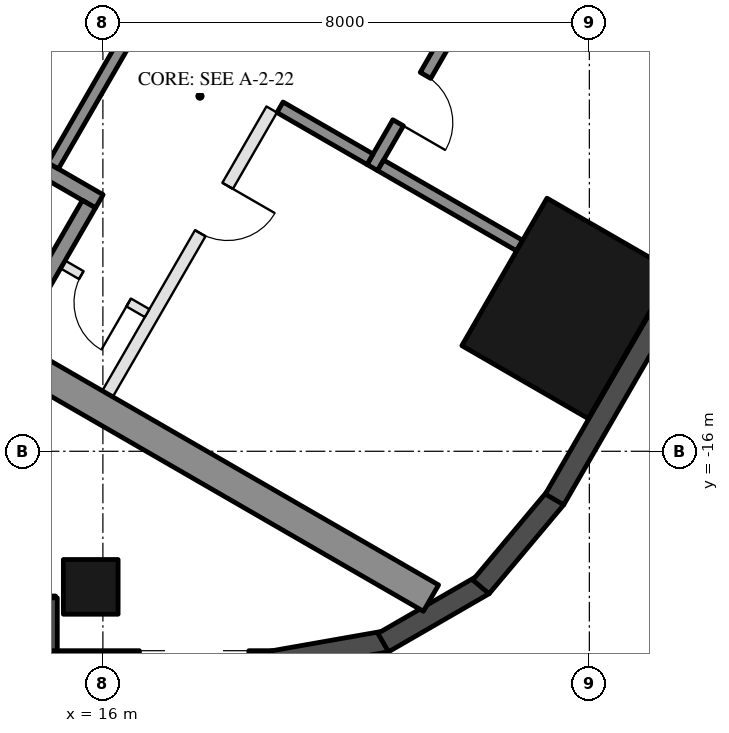
"""IFC4 building model, lengths in metres.
Left out: names, types, materials, properties, quantities, classifications, styles, units other than length and angle.
Written with IfcOpenShell. Run it as: python <this file> out.ifc"""

import sys

from ifc_helpers import new_model, si_unit, direction, frame, frame_2d, origin, origin_2d, place, context, subcontext, project, spatial, rectangle, hollow_rectangle, extrude, element, fill, save


model = new_model("IFC4")
c1 = context("Model", 3, precision=1e-05, world=origin(), true_north=direction((0.0, 1.0)))
c2 = subcontext(c1, "Body", "Model", "MODEL_VIEW")
j1 = project(units=[si_unit("LENGTHUNIT", "METRE"), si_unit("PLANEANGLEUNIT", "RADIAN")], contexts=[c1])
p1 = place(None, origin())
s1 = spatial("IfcSite", under=j1, at=p1, CompositionType="ELEMENT")
p2 = place(p1, origin())
s2 = spatial("IfcBuilding", under=s1, at=p2, CompositionType="ELEMENT")
p3 = place(p2, frame((0.0, 0.0, 102.0)))
s3 = spatial("IfcBuildingStorey", under=s2, at=p3, CompositionType="ELEMENT", Elevation=102.0)
p4 = place(p3, frame((15.8, -18.23, 0.0), z_axis=(0.0, 0.0, 1.0), x_axis=(-1.0, 0.0, 0.0)))
e1 = element("IfcColumn", 1, at=p4, inside=s3, PredefinedType="COLUMN", context=c2, shape_type="SweptSolid", body=[
    extrude(hollow_rectangle(XDim=0.9, YDim=0.9, WallThickness=0.04, at=origin_2d()), origin(), (0.0, 0.0, 1.0), 3.7),
])
p5 = place(p3, frame((23.643, -13.65, 0.0), z_axis=(0.0, 0.0, 1.0), x_axis=(0.5, 0.866025403784, 0.0)))
e2 = element("IfcColumn", 2, at=p5, inside=s3, PredefinedType="COLUMN", context=c2, shape_type="SweptSolid", body=[
    extrude(hollow_rectangle(XDim=2.8, YDim=2.4, WallThickness=0.07, at=origin_2d()), origin(), (0.0, 0.0, 1.0), 3.7),
])
p6 = place(p3, frame((8.48, -18.555, 0.0), z_axis=(0.0, 0.0, 1.0), x_axis=(1.0, 0.0, 0.0)))
e3 = element("IfcWall", 3, at=p6, inside=s3, PredefinedType="SOLIDWALL", context=c2, shape_type="SweptSolid", body=[
    extrude(rectangle(XDim=6.74, YDim=0.35, at=frame_2d((3.37, 0.0))), origin(), (0.0, 0.0, 1.0), 3.55),
])
p7 = place(p6, frame((0.32, 0.0, 0.3)))
e4 = element("IfcOpeningElement", 4, at=p7, cuts=e3, PredefinedType="OPENING", context=c2, shape_type="SweptSolid", body=[
    extrude(rectangle(XDim=2.6, YDim=2.65, at=frame_2d((1.3, 1.325))), frame((0.0, 0.185, 0.0), z_axis=(0.0, -1.0, 0.0), x_axis=(1.0, 0.0, 0.0)), (0.0, 0.0, 1.0), 0.37),
])
p8 = place(p6, frame((3.22, 0.0, 0.3)))
e5 = element("IfcOpeningElement", 5, at=p8, cuts=e3, PredefinedType="OPENING", context=c2, shape_type="SweptSolid", body=[
    extrude(rectangle(XDim=2.6, YDim=2.65, at=frame_2d((1.3, 1.325))), frame((0.0, 0.185, 0.0), z_axis=(0.0, -1.0, 0.0), x_axis=(1.0, 0.0, 0.0)), (0.0, 0.0, 1.0), 0.37),
])
p9 = place(p3, frame((15.075, -18.41, 0.0), z_axis=(0.0, 0.0, 1.0), x_axis=(0.0, -1.0, 0.0)))
e6 = element("IfcWall", 6, at=p9, inside=s3, PredefinedType="SOLIDWALL", context=c2, shape_type="SweptSolid", body=[
    extrude(rectangle(XDim=1.22, YDim=0.35, at=frame_2d((0.61, 0.0))), origin(), (0.0, 0.0, 1.0), 3.55),
])
p10 = place(p3, frame((14.9, -19.455, 0.0), z_axis=(0.0, 0.0, 1.0), x_axis=(1.0, 0.0, 0.0)))
e7 = element("IfcWall", 7, at=p10, inside=s3, PredefinedType="SOLIDWALL", context=c2, shape_type="SweptSolid", body=[
    extrude(rectangle(XDim=3.916, YDim=0.35, at=frame_2d((1.958, 0.0))), origin(), (0.0, 0.0, 1.0), 3.55),
])
p11 = place(p10, frame((1.7, 0.0, 0.3)))
e8 = element("IfcOpeningElement", 8, at=p11, cuts=e7, PredefinedType="OPENING", context=c2, shape_type="SweptSolid", body=[
    extrude(rectangle(XDim=1.8, YDim=2.65, at=frame_2d((0.9, 1.325))), frame((0.0, 0.185, 0.0), z_axis=(0.0, -1.0, 0.0), x_axis=(1.0, 0.0, 0.0)), (0.0, 0.0, 1.0), 0.37),
])
p12 = place(p3, frame((18.785, -19.458, 0.0), z_axis=(0.0, 0.0, 1.0), x_axis=(0.984798995425, 0.173697837091, 0.0)))
e9 = element("IfcWall", 9, at=p12, inside=s3, PredefinedType="SOLIDWALL", context=c2, shape_type="SweptSolid", body=[
    extrude(rectangle(XDim=1.91, YDim=0.35, at=frame_2d((0.955, 0.0))), origin(), (0.0, 0.0, 1.0), 3.55),
])
for number, where, z_axis, x_axis in (
    (10, (20.61, -19.147, 0.0), (0.0, 0.0, 1.0), (0.866, 0.5, 0.0)),
    (11, (22.217, -18.231, 0.0), (0.0, 0.0, 1.0), (0.643, 0.766, 0.0)),
):
    element("IfcWall", number, at=place(p3, frame(where, z_axis=z_axis, x_axis=x_axis)), inside=s3, PredefinedType="SOLIDWALL", context=c2, shape_type="SweptSolid", body=[
        extrude(rectangle(XDim=1.91, YDim=0.35, at=frame_2d((0.955, 0.0))), origin(), (0.0, 0.0, 1.0), 3.55),
    ])
p13 = place(p3, frame((23.427, -16.792, 0.0), z_axis=(0.0, 0.0, 1.0), x_axis=(0.500018773155, 0.866014564827, 0.0)))
e12 = element("IfcWall", 12, at=p13, inside=s3, PredefinedType="SOLIDWALL", context=c2, shape_type="SweptSolid", body=[
    extrude(rectangle(XDim=5.658, YDim=0.35, at=frame_2d((2.829, 0.0))), origin(), (0.0, 0.0, 1.0), 3.55),
])
for number, where, z_axis, x_axis in (
    (13, (8.547, -10.997, 0.0), (0.0, 0.0, 1.0), (0.866, -0.5, 0.0)),
    (14, (13.797, -1.903, 0.0), (0.0, 0.0, 1.0), (0.866, -0.5, 0.0)),
):
    element("IfcWall", number, at=place(p3, frame(where, z_axis=z_axis, x_axis=x_axis)), inside=s3, PredefinedType="SHEAR", context=c2, shape_type="SweptSolid", body=[
        extrude(rectangle(XDim=14.837, YDim=0.5, at=frame_2d((7.418, 0.0))), origin(), (0.0, 0.0, 1.0), 3.5),
    ])
p14 = place(p3, frame((10.356, -8.664, 0.0), z_axis=(0.0, 0.0, 1.0), x_axis=(0.866028629588, -0.499994412703, 0.0)))
e15 = element("IfcWall", 15, at=p14, inside=s3, PredefinedType="SHEAR", context=c2, shape_type="SweptSolid", body=[
    extrude(rectangle(XDim=6.45, YDim=0.25, at=frame_2d((3.225, 0.0))), origin(), (0.0, 0.0, 1.0), 3.5),
])
p15 = place(p14, frame((0.3, 0.0, 0.0)))
e16 = element("IfcOpeningElement", 16, at=p15, cuts=e15, PredefinedType="OPENING", context=c2, shape_type="SweptSolid", body=[
    extrude(rectangle(XDim=1.0, YDim=2.1, at=frame_2d((0.5, 1.05))), frame((0.0, 0.135, 0.0), z_axis=(0.0, -1.0, 0.0), x_axis=(1.0, 0.0, 0.0)), (0.0, 0.0, 1.0), 0.27),
])
p16 = place(p3, frame((14.496, -14.143, 0.0), z_axis=(0.0, 0.0, 1.0), x_axis=(0.500062241894, 0.865989465428, 0.0)))
e17 = element("IfcWall", 17, at=p16, inside=s3, PredefinedType="SHEAR", context=c2, shape_type="SweptSolid", body=[
    extrude(rectangle(XDim=2.55, YDim=0.25, at=frame_2d((1.275, 0.0))), origin(), (0.0, 0.0, 1.0), 3.5),
])
p17 = place(p3, frame((15.181, -11.305, 0.0), z_axis=(0.0, 0.0, 1.0), x_axis=(0.49994636267, 0.866056369097, 0.0)))
e18 = element("IfcWall", 18, at=p17, inside=s3, PredefinedType="SHEAR", context=c2, shape_type="SweptSolid", body=[
    extrude(rectangle(XDim=2.8, YDim=0.2, at=frame_2d((1.4, 0.0))), origin(), (0.0, 0.0, 1.0), 3.5),
])
p18 = place(p3, frame((20.43, -11.333, 0.0), z_axis=(0.0, 0.0, 1.0), x_axis=(0.500001309137, 0.866024647952, 0.0)))
e19 = element("IfcWall", 19, at=p18, inside=s3, PredefinedType="SHEAR", context=c2, shape_type="SweptSolid", body=[
    extrude(rectangle(XDim=2.4, YDim=0.2, at=frame_2d((1.2, 0.0))), origin(), (0.0, 0.0, 1.0), 3.5),
])
p19 = place(p18, frame((0.85, 0.0, 0.0)))
e20 = element("IfcOpeningElement", 20, at=p19, cuts=e19, PredefinedType="OPENING", context=c2, shape_type="SweptSolid", body=[
    extrude(rectangle(XDim=0.9, YDim=2.1, at=frame_2d((0.45, 1.05))), frame((0.0, 0.11, 0.0), z_axis=(0.0, -1.0, 0.0), x_axis=(1.0, 0.0, 0.0)), (0.0, 0.0, 1.0), 0.22),
])
p20 = place(p3, frame((18.913, -10.342, 0.0), z_axis=(0.0, 0.0, 1.0), x_axis=(0.866038183914, -0.499977863513, 0.0)))
e21 = element("IfcWall", 21, at=p20, inside=s3, PredefinedType="SHEAR", context=c2, shape_type="SweptSolid", body=[
    extrude(rectangle(XDim=1.71, YDim=0.2, at=frame_2d((0.855, 0.0))), origin(), (0.0, 0.0, 1.0), 3.5),
])
p21 = place(p3, frame((20.567, -11.297, 0.0), z_axis=(0.0, 0.0, 1.0), x_axis=(0.866060851709, -0.499938597367, 0.0)))
e22 = element("IfcWall", 22, at=p21, inside=s3, PredefinedType="SHEAR", context=c2, shape_type="SweptSolid", body=[
    extrude(rectangle(XDim=2.64, YDim=0.2, at=frame_2d((1.32, 0.0))), origin(), (0.0, 0.0, 1.0), 3.5),
])
p22 = place(p3, frame((16.076, -15.055, 0.0), z_axis=(0.0, 0.0, 1.0), x_axis=(0.499995103361, 0.866028230842, 0.0)))
e23 = element("IfcWall", 23, at=p22, inside=s3, PredefinedType="PARTITIONING", context=c2, shape_type="SweptSolid", body=[
    extrude(rectangle(XDim=5.4, YDim=0.2, at=frame_2d((2.7, 0.0))), origin(), (0.0, 0.0, 1.0), 3.5),
])
p23 = place(p22, frame((3.05, 0.0, 0.0)))
e24 = element("IfcOpeningElement", 24, at=p23, cuts=e23, PredefinedType="OPENING", context=c2, shape_type="SweptSolid", body=[
    extrude(rectangle(XDim=0.9, YDim=2.1, at=frame_2d((0.45, 1.05))), frame((0.0, 0.11, 0.0), z_axis=(0.0, -1.0, 0.0), x_axis=(1.0, 0.0, 0.0)), (0.0, 0.0, 1.0), 0.22),
])
p24 = place(p3, frame((15.342, -12.928, 0.0), z_axis=(0.0, 0.0, 1.0), x_axis=(0.865989903783, -0.500061482766, 0.0)))
e25 = element("IfcWall", 25, at=p24, inside=s3, PredefinedType="PARTITIONING", context=c2, shape_type="SweptSolid", body=[
    extrude(rectangle(XDim=1.6, YDim=0.15, at=frame_2d((0.8, 0.0))), origin(), (0.0, 0.0, 1.0), 3.5),
])
p25 = place(p24, frame((0.35, 0.0, 0.0)))
e26 = element("IfcOpeningElement", 26, at=p25, cuts=e25, PredefinedType="OPENING", context=c2, shape_type="SweptSolid", body=[
    extrude(rectangle(XDim=0.9, YDim=2.1, at=frame_2d((0.45, 1.05))), frame((0.0, 0.085, 0.0), z_axis=(0.0, -1.0, 0.0), x_axis=(1.0, 0.0, 0.0)), (0.0, 0.0, 1.0), 0.17),
])
p26 = place(p25, frame((0.9, 0.0, 0.0), z_axis=(0.0, 0.0, 1.0), x_axis=(-1.0, 0.0, 0.0)))
e27 = element("IfcDoor", 27, at=p26, inside=s3, OperationType="SINGLE_SWING_LEFT", PredefinedType="DOOR", context=c2, shape_type="SweptSolid", body=[
    extrude(rectangle(XDim=0.9, YDim=2.1, at=frame_2d((0.45, 1.05))), frame((0.0, 0.025, 0.0), z_axis=(0.0, -1.0, 0.0), x_axis=(1.0, 0.0, 0.0)), (0.0, 0.0, 1.0), 0.05),
])
fill(e26, e27)
p27 = place(p19, frame((0.9, 0.0, 0.0), z_axis=(0.0, 0.0, 1.0), x_axis=(-1.0, 0.0, 0.0)))
e28 = element("IfcDoor", 28, at=p27, inside=s3, OperationType="SINGLE_SWING_RIGHT", PredefinedType="DOOR", context=c2, shape_type="SweptSolid", body=[
    extrude(rectangle(XDim=0.9, YDim=2.1, at=frame_2d((0.45, 1.05))), frame((0.0, 0.025, 0.0), z_axis=(0.0, -1.0, 0.0), x_axis=(1.0, 0.0, 0.0)), (0.0, 0.0, 1.0), 0.05),
])
fill(e20, e28)
p28 = place(p23, frame((0.9, 0.0, 0.0), z_axis=(0.0, 0.0, 1.0), x_axis=(-1.0, 0.0, 0.0)))
e29 = element("IfcDoor", 29, at=p28, inside=s3, OperationType="SINGLE_SWING_LEFT", PredefinedType="DOOR", context=c2, shape_type="SweptSolid", body=[
    extrude(rectangle(XDim=0.9, YDim=2.1, at=frame_2d((0.45, 1.05))), frame((0.0, 0.025, 0.0), z_axis=(0.0, -1.0, 0.0), x_axis=(1.0, 0.0, 0.0)), (0.0, 0.0, 1.0), 0.05),
])
fill(e24, e29)
save(model, sys.argv[1])
